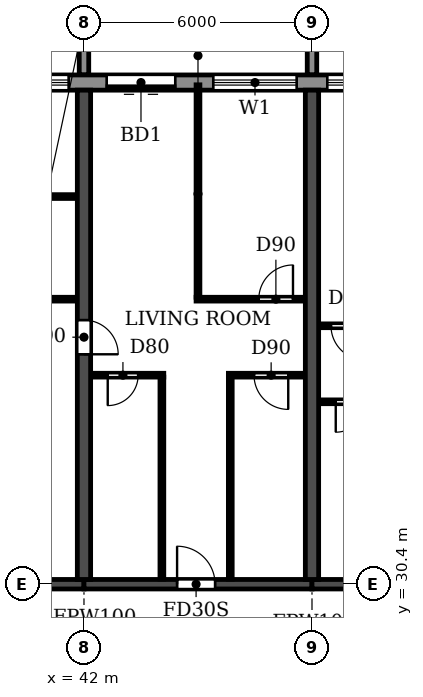
"""IFC4 building model, lengths in metres.
Left out: names, types, materials, properties, quantities, classifications, styles, units other than length and angle.
Written with IfcOpenShell. Run it as: python <this file> out.ifc"""

import sys

from ifc_helpers import new_model, si_unit, direction, frame, frame_2d, origin, place, context, subcontext, project, spatial, polyline, rectangle, outline, extrude, source, transform, mapped, element, fill, save


model = new_model("IFC4")
c1 = context("Model", 3, precision=1e-05, world=origin(), true_north=direction((0.0, 1.0)))
c2 = subcontext(c1, "Body", "Model", "MODEL_VIEW")
j1 = project(units=[si_unit("LENGTHUNIT", "METRE"), si_unit("PLANEANGLEUNIT", "RADIAN")], contexts=[c1])
p1 = place(None, origin())
s1 = spatial("IfcSite", under=j1, at=p1, CompositionType="ELEMENT")
p2 = place(p1, origin())
s2 = spatial("IfcBuilding", under=s1, at=p2, CompositionType="ELEMENT")
p3 = place(p2, frame((0.0, 0.0, 72.9)))
s3 = spatial("IfcBuildingStorey", under=s2, at=p3, CompositionType="ELEMENT", Elevation=72.9)
p4 = place(p3, frame((42.0, 30.525, 0.0), z_axis=(0.0, 0.0, 1.0), x_axis=(0.0, 1.0, 0.0)))
e1 = element("IfcWall", 1, at=p4, inside=s3, PredefinedType="SHEAR", context=c2, shape_type="SweptSolid", body=[
    extrude(rectangle(XDim=12.875, YDim=0.35, at=frame_2d((6.438, 0.0))), origin(), (0.0, 0.0, 1.0), 3.06),
])
p5 = place(p4, frame((5.925, 0.0, 0.0)))
e2 = element("IfcOpeningElement", 2, at=p5, cuts=e1, PredefinedType="OPENING", context=c2, shape_type="SweptSolid", body=[
    extrude(rectangle(XDim=0.9, YDim=2.1, at=frame_2d((0.45, 1.05))), frame((0.0, 0.185, 0.0), z_axis=(0.0, -1.0, 0.0), x_axis=(1.0, 0.0, 0.0)), (0.0, 0.0, 1.0), 0.37),
])
p6 = place(p3, frame((48.0, 30.525, 0.0), z_axis=(0.0, 0.0, 1.0), x_axis=(0.0, 1.0, 0.0)))
e3 = element("IfcWall", 3, at=p6, inside=s3, PredefinedType="SHEAR", context=c2, shape_type="SweptSolid", body=[
    extrude(rectangle(XDim=12.875, YDim=0.35, at=frame_2d((6.438, 0.0))), origin(), (0.0, 0.0, 1.0), 3.06),
])
p7 = place(p3, frame((36.0, 30.4, 0.0), z_axis=(0.0, 0.0, 1.0), x_axis=(1.0, 0.0, 0.0)))
e4 = element("IfcWall", 4, at=p7, inside=s3, PredefinedType="SHEAR", context=c2, shape_type="SweptSolid", body=[
    extrude(rectangle(XDim=6.0, YDim=0.25, at=frame_2d((3.0, 0.0))), origin(), (0.0, 0.0, 1.0), 2.46),
])
p8 = place(p3, frame((42.0, 30.4, 0.0), z_axis=(0.0, 0.0, 1.0), x_axis=(1.0, 0.0, 0.0)))
e5 = element("IfcWall", 5, at=p8, inside=s3, PredefinedType="SHEAR", context=c2, shape_type="SweptSolid", body=[
    extrude(rectangle(XDim=6.0, YDim=0.25, at=frame_2d((3.0, 0.0))), origin(), (0.0, 0.0, 1.0), 2.46),
])
p9 = place(p8, frame((2.45, 0.0, 0.0)))
e6 = element("IfcOpeningElement", 6, at=p9, cuts=e5, PredefinedType="OPENING", context=c2, shape_type="SweptSolid", body=[
    extrude(rectangle(XDim=1.0, YDim=2.1, at=frame_2d((0.5, 1.05))), frame((0.0, 0.135, 0.0), z_axis=(0.0, -1.0, 0.0), x_axis=(1.0, 0.0, 0.0)), (0.0, 0.0, 1.0), 0.27),
])
p10 = place(p3, frame((48.0, 30.4, 0.0), z_axis=(0.0, 0.0, 1.0), x_axis=(1.0, 0.0, 0.0)))
e7 = element("IfcWall", 7, at=p10, inside=s3, PredefinedType="SHEAR", context=c2, shape_type="SweptSolid", body=[
    extrude(rectangle(XDim=6.0, YDim=0.25, at=frame_2d((3.0, 0.0))), origin(), (0.0, 0.0, 1.0), 2.46),
])
p11 = place(p10, frame((2.45, 0.0, 0.0)))
e8 = element("IfcOpeningElement", 8, at=p11, cuts=e7, PredefinedType="OPENING", context=c2, shape_type="SweptSolid", body=[
    extrude(rectangle(XDim=1.0, YDim=2.1, at=frame_2d((0.5, 1.05))), frame((0.0, 0.135, 0.0), z_axis=(0.0, -1.0, 0.0), x_axis=(1.0, 0.0, 0.0)), (0.0, 0.0, 1.0), 0.27),
])
p12 = place(p3, frame((91.317, 43.6, 0.0), z_axis=(0.0, 0.0, 1.0), x_axis=(-1.0, 0.0, 0.0)))
e9 = element("IfcWall", 9, at=p12, inside=s3, PredefinedType="STANDARD", context=c2, shape_type="SweptSolid", body=[
    extrude(rectangle(XDim=80.634, YDim=0.4, at=frame_2d((40.317, 0.0))), origin(), (0.0, 0.0, 1.0), 3.06),
])
p13 = place(p12, frame((76.717, 0.0, 0.9)))
e10 = element("IfcOpeningElement", 10, at=p13, cuts=e9, PredefinedType="OPENING", context=c2, shape_type="SweptSolid", body=[
    extrude(rectangle(XDim=2.2, YDim=1.5, at=frame_2d((1.1, 0.75))), frame((0.0, 0.21, 0.0), z_axis=(0.0, -1.0, 0.0), x_axis=(1.0, 0.0, 0.0)), (0.0, 0.0, 1.0), 0.42),
])
p14 = place(p12, frame((73.917, 0.0, 0.0)))
e11 = element("IfcOpeningElement", 11, at=p14, cuts=e9, PredefinedType="OPENING", context=c2, shape_type="SweptSolid", body=[
    extrude(rectangle(XDim=1.8, YDim=2.4, at=frame_2d((0.9, 1.2))), frame((0.0, 0.21, 0.0), z_axis=(0.0, -1.0, 0.0), x_axis=(1.0, 0.0, 0.0)), (0.0, 0.0, 1.0), 0.42),
])
p15 = place(p12, frame((70.917, 0.0, 0.0)))
e12 = element("IfcOpeningElement", 12, at=p15, cuts=e9, PredefinedType="OPENING", context=c2, shape_type="SweptSolid", body=[
    extrude(rectangle(XDim=1.8, YDim=2.4, at=frame_2d((0.9, 1.2))), frame((0.0, 0.21, 0.0), z_axis=(0.0, -1.0, 0.0), x_axis=(1.0, 0.0, 0.0)), (0.0, 0.0, 1.0), 0.42),
])
p16 = place(p12, frame((67.717, 0.0, 0.9)))
e13 = element("IfcOpeningElement", 13, at=p16, cuts=e9, PredefinedType="OPENING", context=c2, shape_type="SweptSolid", body=[
    extrude(rectangle(XDim=2.2, YDim=1.5, at=frame_2d((1.1, 0.75))), frame((0.0, 0.21, 0.0), z_axis=(0.0, -1.0, 0.0), x_axis=(1.0, 0.0, 0.0)), (0.0, 0.0, 1.0), 0.42),
])
p17 = place(p12, frame((64.717, 0.0, 0.9)))
e14 = element("IfcOpeningElement", 14, at=p17, cuts=e9, PredefinedType="OPENING", context=c2, shape_type="SweptSolid", body=[
    extrude(rectangle(XDim=2.2, YDim=1.5, at=frame_2d((1.1, 0.75))), frame((0.0, 0.21, 0.0), z_axis=(0.0, -1.0, 0.0), x_axis=(1.0, 0.0, 0.0)), (0.0, 0.0, 1.0), 0.42),
])
p18 = place(p12, frame((61.917, 0.0, 0.0)))
e15 = element("IfcOpeningElement", 15, at=p18, cuts=e9, PredefinedType="OPENING", context=c2, shape_type="SweptSolid", body=[
    extrude(rectangle(XDim=1.8, YDim=2.4, at=frame_2d((0.9, 1.2))), frame((0.0, 0.21, 0.0), z_axis=(0.0, -1.0, 0.0), x_axis=(1.0, 0.0, 0.0)), (0.0, 0.0, 1.0), 0.42),
])
p19 = place(p12, frame((58.717, 0.0, 0.9)))
e16 = element("IfcOpeningElement", 16, at=p19, cuts=e9, PredefinedType="OPENING", context=c2, shape_type="SweptSolid", body=[
    extrude(rectangle(XDim=2.2, YDim=1.5, at=frame_2d((1.1, 0.75))), frame((0.0, 0.21, 0.0), z_axis=(0.0, -1.0, 0.0), x_axis=(1.0, 0.0, 0.0)), (0.0, 0.0, 1.0), 0.42),
])
p20 = place(p12, frame((55.917, 0.0, 0.0)))
e17 = element("IfcOpeningElement", 17, at=p20, cuts=e9, PredefinedType="OPENING", context=c2, shape_type="SweptSolid", body=[
    extrude(rectangle(XDim=1.8, YDim=2.4, at=frame_2d((0.9, 1.2))), frame((0.0, 0.21, 0.0), z_axis=(0.0, -1.0, 0.0), x_axis=(1.0, 0.0, 0.0)), (0.0, 0.0, 1.0), 0.42),
])
p21 = place(p12, frame((52.717, 0.0, 0.9)))
e18 = element("IfcOpeningElement", 18, at=p21, cuts=e9, PredefinedType="OPENING", context=c2, shape_type="SweptSolid", body=[
    extrude(rectangle(XDim=2.2, YDim=1.5, at=frame_2d((1.1, 0.75))), frame((0.0, 0.21, 0.0), z_axis=(0.0, -1.0, 0.0), x_axis=(1.0, 0.0, 0.0)), (0.0, 0.0, 1.0), 0.42),
])
p22 = place(p12, frame((49.717, 0.0, 0.9)))
e19 = element("IfcOpeningElement", 19, at=p22, cuts=e9, PredefinedType="OPENING", context=c2, shape_type="SweptSolid", body=[
    extrude(rectangle(XDim=2.2, YDim=1.5, at=frame_2d((1.1, 0.75))), frame((0.0, 0.21, 0.0), z_axis=(0.0, -1.0, 0.0), x_axis=(1.0, 0.0, 0.0)), (0.0, 0.0, 1.0), 0.42),
])
p23 = place(p12, frame((46.917, 0.0, 0.0)))
e20 = element("IfcOpeningElement", 20, at=p23, cuts=e9, PredefinedType="OPENING", context=c2, shape_type="SweptSolid", body=[
    extrude(rectangle(XDim=1.8, YDim=2.4, at=frame_2d((0.9, 1.2))), frame((0.0, 0.21, 0.0), z_axis=(0.0, -1.0, 0.0), x_axis=(1.0, 0.0, 0.0)), (0.0, 0.0, 1.0), 0.42),
])
p24 = place(p12, frame((43.717, 0.0, 0.9)))
e21 = element("IfcOpeningElement", 21, at=p24, cuts=e9, PredefinedType="OPENING", context=c2, shape_type="SweptSolid", body=[
    extrude(rectangle(XDim=2.2, YDim=1.5, at=frame_2d((1.1, 0.75))), frame((0.0, 0.21, 0.0), z_axis=(0.0, -1.0, 0.0), x_axis=(1.0, 0.0, 0.0)), (0.0, 0.0, 1.0), 0.42),
])
p25 = place(p12, frame((40.717, 0.0, 0.9)))
e22 = element("IfcOpeningElement", 22, at=p25, cuts=e9, PredefinedType="OPENING", context=c2, shape_type="SweptSolid", body=[
    extrude(rectangle(XDim=2.2, YDim=1.5, at=frame_2d((1.1, 0.75))), frame((0.0, 0.21, 0.0), z_axis=(0.0, -1.0, 0.0), x_axis=(1.0, 0.0, 0.0)), (0.0, 0.0, 1.0), 0.42),
])
p26 = place(p12, frame((37.917, 0.0, 0.0)))
e23 = element("IfcOpeningElement", 23, at=p26, cuts=e9, PredefinedType="OPENING", context=c2, shape_type="SweptSolid", body=[
    extrude(rectangle(XDim=1.8, YDim=2.4, at=frame_2d((0.9, 1.2))), frame((0.0, 0.21, 0.0), z_axis=(0.0, -1.0, 0.0), x_axis=(1.0, 0.0, 0.0)), (0.0, 0.0, 1.0), 0.42),
])
p27 = place(p12, frame((34.717, 0.0, 0.9)))
e24 = element("IfcOpeningElement", 24, at=p27, cuts=e9, PredefinedType="OPENING", context=c2, shape_type="SweptSolid", body=[
    extrude(rectangle(XDim=2.2, YDim=1.5, at=frame_2d((1.1, 0.75))), frame((0.0, 0.21, 0.0), z_axis=(0.0, -1.0, 0.0), x_axis=(1.0, 0.0, 0.0)), (0.0, 0.0, 1.0), 0.42),
])
p28 = place(p12, frame((31.917, 0.0, 0.0)))
e25 = element("IfcOpeningElement", 25, at=p28, cuts=e9, PredefinedType="OPENING", context=c2, shape_type="SweptSolid", body=[
    extrude(rectangle(XDim=1.8, YDim=2.4, at=frame_2d((0.9, 1.2))), frame((0.0, 0.21, 0.0), z_axis=(0.0, -1.0, 0.0), x_axis=(1.0, 0.0, 0.0)), (0.0, 0.0, 1.0), 0.42),
])
p29 = place(p12, frame((28.717, 0.0, 0.9)))
e26 = element("IfcOpeningElement", 26, at=p29, cuts=e9, PredefinedType="OPENING", context=c2, shape_type="SweptSolid", body=[
    extrude(rectangle(XDim=2.2, YDim=1.5, at=frame_2d((1.1, 0.75))), frame((0.0, 0.21, 0.0), z_axis=(0.0, -1.0, 0.0), x_axis=(1.0, 0.0, 0.0)), (0.0, 0.0, 1.0), 0.42),
])
p30 = place(p12, frame((25.717, 0.0, 0.9)))
e27 = element("IfcOpeningElement", 27, at=p30, cuts=e9, PredefinedType="OPENING", context=c2, shape_type="SweptSolid", body=[
    extrude(rectangle(XDim=2.2, YDim=1.5, at=frame_2d((1.1, 0.75))), frame((0.0, 0.21, 0.0), z_axis=(0.0, -1.0, 0.0), x_axis=(1.0, 0.0, 0.0)), (0.0, 0.0, 1.0), 0.42),
])
p31 = place(p12, frame((22.717, 0.0, 0.9)))
e28 = element("IfcOpeningElement", 28, at=p31, cuts=e9, PredefinedType="OPENING", context=c2, shape_type="SweptSolid", body=[
    extrude(rectangle(XDim=2.2, YDim=1.5, at=frame_2d((1.1, 0.75))), frame((0.0, 0.21, 0.0), z_axis=(0.0, -1.0, 0.0), x_axis=(1.0, 0.0, 0.0)), (0.0, 0.0, 1.0), 0.42),
])
p32 = place(p12, frame((19.917, 0.0, 0.0)))
e29 = element("IfcOpeningElement", 29, at=p32, cuts=e9, PredefinedType="OPENING", context=c2, shape_type="SweptSolid", body=[
    extrude(rectangle(XDim=1.8, YDim=2.4, at=frame_2d((0.9, 1.2))), frame((0.0, 0.21, 0.0), z_axis=(0.0, -1.0, 0.0), x_axis=(1.0, 0.0, 0.0)), (0.0, 0.0, 1.0), 0.42),
])
p33 = place(p12, frame((16.717, 0.0, 0.9)))
e30 = element("IfcOpeningElement", 30, at=p33, cuts=e9, PredefinedType="OPENING", context=c2, shape_type="SweptSolid", body=[
    extrude(rectangle(XDim=2.2, YDim=1.5, at=frame_2d((1.1, 0.75))), frame((0.0, 0.21, 0.0), z_axis=(0.0, -1.0, 0.0), x_axis=(1.0, 0.0, 0.0)), (0.0, 0.0, 1.0), 0.42),
])
p34 = place(p12, frame((13.717, 0.0, 0.9)))
e31 = element("IfcOpeningElement", 31, at=p34, cuts=e9, PredefinedType="OPENING", context=c2, shape_type="SweptSolid", body=[
    extrude(rectangle(XDim=2.2, YDim=1.5, at=frame_2d((1.1, 0.75))), frame((0.0, 0.21, 0.0), z_axis=(0.0, -1.0, 0.0), x_axis=(1.0, 0.0, 0.0)), (0.0, 0.0, 1.0), 0.42),
])
p35 = place(p12, frame((10.717, 0.0, 0.9)))
e32 = element("IfcOpeningElement", 32, at=p35, cuts=e9, PredefinedType="OPENING", context=c2, shape_type="SweptSolid", body=[
    extrude(rectangle(XDim=2.2, YDim=1.5, at=frame_2d((1.1, 0.75))), frame((0.0, 0.21, 0.0), z_axis=(0.0, -1.0, 0.0), x_axis=(1.0, 0.0, 0.0)), (0.0, 0.0, 1.0), 0.42),
])
p36 = place(p12, frame((7.917, 0.0, 0.0)))
e33 = element("IfcOpeningElement", 33, at=p36, cuts=e9, PredefinedType="OPENING", context=c2, shape_type="SweptSolid", body=[
    extrude(rectangle(XDim=1.8, YDim=2.4, at=frame_2d((0.9, 1.2))), frame((0.0, 0.21, 0.0), z_axis=(0.0, -1.0, 0.0), x_axis=(1.0, 0.0, 0.0)), (0.0, 0.0, 1.0), 0.42),
])
p37 = place(p12, frame((4.717, 0.0, 0.9)))
e34 = element("IfcOpeningElement", 34, at=p37, cuts=e9, PredefinedType="OPENING", context=c2, shape_type="SweptSolid", body=[
    extrude(rectangle(XDim=2.2, YDim=1.5, at=frame_2d((1.1, 0.75))), frame((0.0, 0.21, 0.0), z_axis=(0.0, -1.0, 0.0), x_axis=(1.0, 0.0, 0.0)), (0.0, 0.0, 1.0), 0.42),
])
p38 = place(p12, frame((1.917, 0.0, 0.0)))
e35 = element("IfcOpeningElement", 35, at=p38, cuts=e9, PredefinedType="OPENING", context=c2, shape_type="SweptSolid", body=[
    extrude(rectangle(XDim=1.8, YDim=2.4, at=frame_2d((0.9, 1.2))), frame((0.0, 0.21, 0.0), z_axis=(0.0, -1.0, 0.0), x_axis=(1.0, 0.0, 0.0)), (0.0, 0.0, 1.0), 0.42),
])
m1 = source(origin(), c2, "Body", "SweptSolid", [
    extrude(outline(polyline([(0.0, 0.0), (0.25, 0.0), (0.25, 3.1), (0.0, 3.1), (0.0, 0.0)])), origin(), (0.0, 0.0, 1.0), 3.1),
])
for number, where in (
    (36, (41.875, 43.8, 0.0)),
    (37, (47.875, 43.8, 0.0)),
):
    element("IfcWall", number, at=place(p3, frame(where)), inside=s3, PredefinedType="STANDARD", context=c2, shape_type="MappedRepresentation", body=[
        mapped(m1, transform((0.0, 0.0, 0.0))),
    ])
p39 = place(p3, frame((48.185, 35.2, 0.0), z_axis=(0.0, 0.0, 1.0), x_axis=(1.0, 0.0, 0.0)))
e38 = element("IfcWall", 38, at=p39, inside=s3, PredefinedType="PARTITIONING", context=c2, shape_type="SweptSolid", body=[
    extrude(rectangle(XDim=1.915, YDim=0.1, at=frame_2d((0.958, 0.0))), origin(), (0.0, 0.0, 1.0), 3.06),
])
p40 = place(p39, frame((0.44, 0.0, 0.0)))
e39 = element("IfcOpeningElement", 39, at=p40, cuts=e38, PredefinedType="OPENING", context=c2, shape_type="SweptSolid", body=[
    extrude(rectangle(XDim=0.8, YDim=2.1, at=frame_2d((0.4, 1.05))), frame((0.0, 0.06, 0.0), z_axis=(0.0, -1.0, 0.0), x_axis=(1.0, 0.0, 0.0)), (0.0, 0.0, 1.0), 0.12),
])
p41 = place(p3, frame((42.185, 35.9, 0.0), z_axis=(0.0, 0.0, 1.0), x_axis=(1.0, 0.0, 0.0)))
e40 = element("IfcWall", 40, at=p41, inside=s3, PredefinedType="PARTITIONING", context=c2, shape_type="SweptSolid", body=[
    extrude(rectangle(XDim=1.915, YDim=0.1, at=frame_2d((0.958, 0.0))), origin(), (0.0, 0.0, 1.0), 3.06),
])
p42 = place(p41, frame((0.44, 0.0, 0.0)))
e41 = element("IfcOpeningElement", 41, at=p42, cuts=e40, PredefinedType="OPENING", context=c2, shape_type="SweptSolid", body=[
    extrude(rectangle(XDim=0.8, YDim=2.1, at=frame_2d((0.4, 1.05))), frame((0.0, 0.06, 0.0), z_axis=(0.0, -1.0, 0.0), x_axis=(1.0, 0.0, 0.0)), (0.0, 0.0, 1.0), 0.12),
])
p43 = place(p3, frame((45.8, 35.9, 0.0), z_axis=(0.0, 0.0, 1.0), x_axis=(1.0, 0.0, 0.0)))
e42 = element("IfcWall", 42, at=p43, inside=s3, PredefinedType="PARTITIONING", context=c2, shape_type="SweptSolid", body=[
    extrude(rectangle(XDim=2.015, YDim=0.1, at=frame_2d((1.007, 0.0))), origin(), (0.0, 0.0, 1.0), 3.06),
])
p44 = place(p43, frame((0.675, 0.0, 0.0)))
e43 = element("IfcOpeningElement", 43, at=p44, cuts=e42, PredefinedType="OPENING", context=c2, shape_type="SweptSolid", body=[
    extrude(rectangle(XDim=0.9, YDim=2.1, at=frame_2d((0.45, 1.05))), frame((0.0, 0.06, 0.0), z_axis=(0.0, -1.0, 0.0), x_axis=(1.0, 0.0, 0.0)), (0.0, 0.0, 1.0), 0.12),
])
p45 = place(p3, frame((48.185, 37.2, 0.0), z_axis=(0.0, 0.0, 1.0), x_axis=(1.0, 0.0, 0.0)))
e44 = element("IfcWall", 44, at=p45, inside=s3, PredefinedType="PARTITIONING", context=c2, shape_type="SweptSolid", body=[
    extrude(rectangle(XDim=2.865, YDim=0.1, at=frame_2d((1.433, 0.0))), origin(), (0.0, 0.0, 1.0), 3.06),
])
p46 = place(p45, frame((0.315, 0.0, 0.0)))
e45 = element("IfcOpeningElement", 45, at=p46, cuts=e44, PredefinedType="OPENING", context=c2, shape_type="SweptSolid", body=[
    extrude(rectangle(XDim=0.9, YDim=2.1, at=frame_2d((0.45, 1.05))), frame((0.0, 0.06, 0.0), z_axis=(0.0, -1.0, 0.0), x_axis=(1.0, 0.0, 0.0)), (0.0, 0.0, 1.0), 0.12),
])
p47 = place(p3, frame((36.185, 37.9, 0.0), z_axis=(0.0, 0.0, 1.0), x_axis=(1.0, 0.0, 0.0)))
e46 = element("IfcWall", 46, at=p47, inside=s3, PredefinedType="PARTITIONING", context=c2, shape_type="SweptSolid", body=[
    extrude(rectangle(XDim=5.63, YDim=0.1, at=frame_2d((2.815, 0.0))), origin(), (0.0, 0.0, 1.0), 3.06),
])
p48 = place(p47, frame((1.965, 0.0, 0.0)))
e47 = element("IfcOpeningElement", 47, at=p48, cuts=e46, PredefinedType="OPENING", context=c2, shape_type="SweptSolid", body=[
    extrude(rectangle(XDim=0.9, YDim=2.1, at=frame_2d((0.45, 1.05))), frame((0.0, 0.06, 0.0), z_axis=(0.0, -1.0, 0.0), x_axis=(1.0, 0.0, 0.0)), (0.0, 0.0, 1.0), 0.12),
])
p49 = place(p3, frame((44.95, 37.9, 0.0), z_axis=(0.0, 0.0, 1.0), x_axis=(1.0, 0.0, 0.0)))
e48 = element("IfcWall", 48, at=p49, inside=s3, PredefinedType="PARTITIONING", context=c2, shape_type="SweptSolid", body=[
    extrude(rectangle(XDim=2.865, YDim=0.1, at=frame_2d((1.433, 0.0))), origin(), (0.0, 0.0, 1.0), 3.06),
])
p50 = place(p49, frame((1.65, 0.0, 0.0)))
e49 = element("IfcOpeningElement", 49, at=p50, cuts=e48, PredefinedType="OPENING", context=c2, shape_type="SweptSolid", body=[
    extrude(rectangle(XDim=0.9, YDim=2.1, at=frame_2d((0.45, 1.05))), frame((0.0, 0.06, 0.0), z_axis=(0.0, -1.0, 0.0), x_axis=(1.0, 0.0, 0.0)), (0.0, 0.0, 1.0), 0.12),
])
p51 = place(p3, frame((39.85, 40.6, 0.0), z_axis=(0.0, 0.0, 1.0), x_axis=(1.0, 0.0, 0.0)))
e50 = element("IfcWall", 50, at=p51, inside=s3, PredefinedType="PARTITIONING", context=c2, shape_type="SweptSolid", body=[
    extrude(rectangle(XDim=1.965, YDim=0.1, at=frame_2d((0.982, 0.0))), origin(), (0.0, 0.0, 1.0), 3.06),
])
p52 = place(p3, frame((44.05, 30.535, 0.0), z_axis=(0.0, 0.0, 1.0), x_axis=(0.0, 1.0, 0.0)))
e51 = element("IfcWall", 51, at=p52, inside=s3, PredefinedType="PARTITIONING", context=c2, shape_type="SweptSolid", body=[
    extrude(rectangle(XDim=5.315, YDim=0.1, at=frame_2d((2.658, 0.0))), origin(), (0.0, 0.0, 1.0), 3.06),
])
p53 = place(p3, frame((45.0, 37.95, 0.0), z_axis=(0.0, 0.0, 1.0), x_axis=(0.0, 1.0, 0.0)))
e52 = element("IfcWall", 52, at=p53, inside=s3, PredefinedType="PARTITIONING", context=c2, shape_type="SweptSolid", body=[
    extrude(rectangle(XDim=5.59, YDim=0.1, at=frame_2d((2.795, 0.0))), origin(), (0.0, 0.0, 1.0), 3.06),
])
p54 = place(p3, frame((45.85, 30.535, 0.0), z_axis=(0.0, 0.0, 1.0), x_axis=(0.0, 1.0, 0.0)))
e53 = element("IfcWall", 53, at=p54, inside=s3, PredefinedType="PARTITIONING", context=c2, shape_type="SweptSolid", body=[
    extrude(rectangle(XDim=5.315, YDim=0.1, at=frame_2d((2.658, 0.0))), origin(), (0.0, 0.0, 1.0), 3.06),
])
p55 = place(p22, origin())
e54 = element("IfcWindow", 54, at=p55, inside=s3, PartitioningType="DOUBLE_PANEL_HORIZONTAL", PredefinedType="WINDOW", context=c2, shape_type="SweptSolid", body=[
    extrude(rectangle(XDim=2.2, YDim=1.5, at=frame_2d((1.1, 0.75))), frame((0.0, 0.03, 0.0), z_axis=(0.0, -1.0, 0.0), x_axis=(1.0, 0.0, 0.0)), (0.0, 0.0, 1.0), 0.06),
])
fill(e19, e54)
p56 = place(p23, origin())
e55 = element("IfcDoor", 55, at=p56, inside=s3, OperationType="DOUBLE_DOOR_SLIDING", PredefinedType="DOOR", context=c2, shape_type="SweptSolid", body=[
    extrude(rectangle(XDim=1.8, YDim=2.4, at=frame_2d((0.9, 1.2))), frame((0.0, 0.025, 0.0), z_axis=(0.0, -1.0, 0.0), x_axis=(1.0, 0.0, 0.0)), (0.0, 0.0, 1.0), 0.05),
])
fill(e20, e55)
p57 = place(p24, origin())
e56 = element("IfcWindow", 56, at=p57, inside=s3, PartitioningType="DOUBLE_PANEL_HORIZONTAL", PredefinedType="WINDOW", context=c2, shape_type="SweptSolid", body=[
    extrude(rectangle(XDim=2.2, YDim=1.5, at=frame_2d((1.1, 0.75))), frame((0.0, 0.03, 0.0), z_axis=(0.0, -1.0, 0.0), x_axis=(1.0, 0.0, 0.0)), (0.0, 0.0, 1.0), 0.06),
])
fill(e21, e56)
p58 = place(p25, origin())
e57 = element("IfcWindow", 57, at=p58, inside=s3, PartitioningType="DOUBLE_PANEL_HORIZONTAL", PredefinedType="WINDOW", context=c2, shape_type="SweptSolid", body=[
    extrude(rectangle(XDim=2.2, YDim=1.5, at=frame_2d((1.1, 0.75))), frame((0.0, 0.03, 0.0), z_axis=(0.0, -1.0, 0.0), x_axis=(1.0, 0.0, 0.0)), (0.0, 0.0, 1.0), 0.06),
])
fill(e22, e57)
p59 = place(p5, frame((0.9, 0.0, 0.0), z_axis=(0.0, 0.0, 1.0), x_axis=(-1.0, 0.0, 0.0)))
e58 = element("IfcDoor", 58, at=p59, inside=s3, OperationType="SINGLE_SWING_RIGHT", PredefinedType="DOOR", context=c2, shape_type="SweptSolid", body=[
    extrude(rectangle(XDim=0.9, YDim=2.1, at=frame_2d((0.45, 1.05))), frame((0.0, 0.025, 0.0), z_axis=(0.0, -1.0, 0.0), x_axis=(1.0, 0.0, 0.0)), (0.0, 0.0, 1.0), 0.05),
])
fill(e2, e58)
p60 = place(p42, frame((0.8, 0.0, 0.0), z_axis=(0.0, 0.0, 1.0), x_axis=(-1.0, 0.0, 0.0)))
e59 = element("IfcDoor", 59, at=p60, inside=s3, OperationType="SINGLE_SWING_RIGHT", PredefinedType="DOOR", context=c2, shape_type="SweptSolid", body=[
    extrude(rectangle(XDim=0.8, YDim=2.1, at=frame_2d((0.4, 1.05))), frame((0.0, 0.025, 0.0), z_axis=(0.0, -1.0, 0.0), x_axis=(1.0, 0.0, 0.0)), (0.0, 0.0, 1.0), 0.05),
])
fill(e41, e59)
p61 = place(p9, origin())
e60 = element("IfcDoor", 60, at=p61, inside=s3, OperationType="SINGLE_SWING_LEFT", PredefinedType="DOOR", context=c2, shape_type="SweptSolid", body=[
    extrude(rectangle(XDim=1.0, YDim=2.1, at=frame_2d((0.5, 1.05))), frame((0.0, 0.025, 0.0), z_axis=(0.0, -1.0, 0.0), x_axis=(1.0, 0.0, 0.0)), (0.0, 0.0, 1.0), 0.05),
])
fill(e6, e60)
p62 = place(p44, frame((0.9, 0.0, 0.0), z_axis=(0.0, 0.0, 1.0), x_axis=(-1.0, 0.0, 0.0)))
e61 = element("IfcDoor", 61, at=p62, inside=s3, OperationType="SINGLE_SWING_LEFT", PredefinedType="DOOR", context=c2, shape_type="SweptSolid", body=[
    extrude(rectangle(XDim=0.9, YDim=2.1, at=frame_2d((0.45, 1.05))), frame((0.0, 0.025, 0.0), z_axis=(0.0, -1.0, 0.0), x_axis=(1.0, 0.0, 0.0)), (0.0, 0.0, 1.0), 0.05),
])
fill(e43, e61)
p63 = place(p50, origin())
e62 = element("IfcDoor", 62, at=p63, inside=s3, OperationType="SINGLE_SWING_RIGHT", PredefinedType="DOOR", context=c2, shape_type="SweptSolid", body=[
    extrude(rectangle(XDim=0.9, YDim=2.1, at=frame_2d((0.45, 1.05))), frame((0.0, 0.025, 0.0), z_axis=(0.0, -1.0, 0.0), x_axis=(1.0, 0.0, 0.0)), (0.0, 0.0, 1.0), 0.05),
])
fill(e49, e62)
p64 = place(p46, frame((0.9, 0.0, 0.0), z_axis=(0.0, 0.0, 1.0), x_axis=(-1.0, 0.0, 0.0)))
e63 = element("IfcDoor", 63, at=p64, inside=s3, OperationType="SINGLE_SWING_LEFT", PredefinedType="DOOR", context=c2, shape_type="SweptSolid", body=[
    extrude(rectangle(XDim=0.9, YDim=2.1, at=frame_2d((0.45, 1.05))), frame((0.0, 0.025, 0.0), z_axis=(0.0, -1.0, 0.0), x_axis=(1.0, 0.0, 0.0)), (0.0, 0.0, 1.0), 0.05),
])
fill(e45, e63)
p65 = place(p40, frame((0.8, 0.0, 0.0), z_axis=(0.0, 0.0, 1.0), x_axis=(-1.0, 0.0, 0.0)))
e64 = element("IfcDoor", 64, at=p65, inside=s3, OperationType="SINGLE_SWING_RIGHT", PredefinedType="DOOR", context=c2, shape_type="SweptSolid", body=[
    extrude(rectangle(XDim=0.8, YDim=2.1, at=frame_2d((0.4, 1.05))), frame((0.0, 0.025, 0.0), z_axis=(0.0, -1.0, 0.0), x_axis=(1.0, 0.0, 0.0)), (0.0, 0.0, 1.0), 0.05),
])
fill(e39, e64)
save(model, sys.argv[1])
